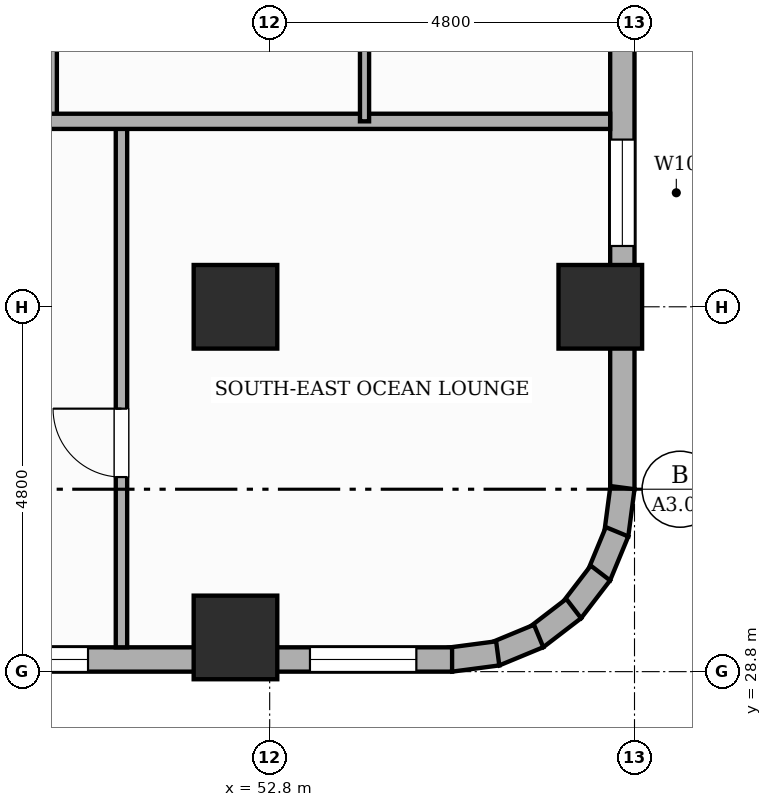
"""IFC4 building model, lengths in metres.
Left out: names, types, materials, properties, quantities, classifications, styles, units other than length and angle.
Written with IfcOpenShell. Run it as: python <this file> out.ifc"""

import sys

from ifc_helpers import new_model, si_unit, direction, frame, frame_2d, origin, origin_2d, place, context, subcontext, project, spatial, rectangle, extrude, element, fill, save


model = new_model("IFC4")
c1 = context("Model", 3, precision=1e-05, world=origin(), true_north=direction((0.0, 1.0)))
c2 = subcontext(c1, "Body", "Model", "MODEL_VIEW")
j1 = project(units=[si_unit("LENGTHUNIT", "METRE"), si_unit("PLANEANGLEUNIT", "RADIAN")], contexts=[c1])
p1 = place(None, origin())
s1 = spatial("IfcSite", under=j1, at=p1, CompositionType="ELEMENT")
p2 = place(p1, origin())
s2 = spatial("IfcBuilding", under=s1, at=p2, CompositionType="ELEMENT")
p3 = place(p2, frame((0.0, 0.0, 25.0)))
s3 = spatial("IfcBuildingStorey", under=s2, at=p3, CompositionType="ELEMENT", Elevation=25.0)
for number, where, z_axis, x_axis in (
    (1, (52.35, 29.25, 0.0), (0.0, 0.0, 1.0), (1.0, 0.0, 0.0)),
    (2, (52.35, 33.6, 0.0), (0.0, 0.0, 1.0), (1.0, 0.0, 0.0)),
    (3, (57.15, 33.6, 0.0), (0.0, 0.0, 1.0), (1.0, 0.0, 0.0)),
):
    element("IfcColumn", number, at=place(p3, frame(where, z_axis=z_axis, x_axis=x_axis)), inside=s3, PredefinedType="COLUMN", context=c2, shape_type="SweptSolid", body=[
        extrude(rectangle(XDim=1.1, YDim=1.1, at=origin_2d()), origin(), (0.0, 0.0, 1.0), 3.6),
    ])
p4 = place(p3, frame((57.44, 45.6, 0.0), z_axis=(0.0, 0.0, 1.0), x_axis=(0.0, -1.0, 0.0)))
e4 = element("IfcWall", 4, at=p4, inside=s3, PredefinedType="STANDARD", context=c2, shape_type="SweptSolid", body=[
    extrude(rectangle(XDim=14.4, YDim=0.32, at=frame_2d((7.2, 0.0))), origin(), (0.0, 0.0, 1.0), 2.53),
])
p5 = place(p4, frame((5.428, 0.0, 0.45)))
e5 = element("IfcOpeningElement", 5, at=p5, cuts=e4, PredefinedType="OPENING", context=c2, shape_type="SweptSolid", body=[
    extrude(rectangle(XDim=0.95, YDim=1.8, at=frame_2d((0.475, 0.9))), frame((0.0, 0.17, 0.0), z_axis=(0.0, -1.0, 0.0), x_axis=(1.0, 0.0, 0.0)), (0.0, 0.0, 1.0), 0.34),
])
p6 = place(p4, frame((9.8, 0.0, 0.65)))
e6 = element("IfcOpeningElement", 6, at=p6, cuts=e4, PredefinedType="OPENING", context=c2, shape_type="SweptSolid", body=[
    extrude(rectangle(XDim=1.4, YDim=1.1, at=frame_2d((0.7, 0.55))), frame((0.0, 0.17, 0.0), z_axis=(0.0, -1.0, 0.0), x_axis=(1.0, 0.0, 0.0)), (0.0, 0.0, 1.0), 0.34),
])
p7 = place(p4, frame((0.771, 0.0, 0.45)))
e7 = element("IfcOpeningElement", 7, at=p7, cuts=e4, PredefinedType="OPENING", context=c2, shape_type="SweptSolid", body=[
    extrude(rectangle(XDim=0.75, YDim=1.8, at=frame_2d((0.375, 0.9))), frame((0.0, 0.17, 0.0), z_axis=(0.0, -1.0, 0.0), x_axis=(1.0, 0.0, 0.0)), (0.0, 0.0, 1.0), 0.34),
])
p8 = place(p3, frame((57.441, 31.221, 0.0), z_axis=(0.0, 0.0, 1.0), x_axis=(-0.130504898859, -0.991447664465, 0.0)))
e8 = element("IfcWall", 8, at=p8, inside=s3, PredefinedType="STANDARD", context=c2, shape_type="SweptSolid", body=[
    extrude(rectangle(XDim=0.627, YDim=0.32, at=frame_2d((0.313, 0.0))), origin(), (0.0, 0.0, 1.0), 3.35),
])
p9 = place(p3, frame((57.37, 30.64, 0.0), z_axis=(0.0, 0.0, 1.0), x_axis=(-0.382787856107, -0.923836271867, 0.0)))
e9 = element("IfcWall", 9, at=p9, inside=s3, PredefinedType="STANDARD", context=c2, shape_type="SweptSolid", body=[
    extrude(rectangle(XDim=0.626, YDim=0.32, at=frame_2d((0.313, 0.0))), origin(), (0.0, 0.0, 1.0), 3.35),
])
p10 = place(p3, frame((57.152, 30.097, 0.0), z_axis=(0.0, 0.0, 1.0), x_axis=(-0.608693302629, -0.793405610854, 0.0)))
e10 = element("IfcWall", 10, at=p10, inside=s3, PredefinedType="STANDARD", context=c2, shape_type="SweptSolid", body=[
    extrude(rectangle(XDim=0.626, YDim=0.32, at=frame_2d((0.313, 0.0))), origin(), (0.0, 0.0, 1.0), 3.35),
])
p11 = place(p3, frame((56.8, 29.63, 0.0), z_axis=(0.0, 0.0, 1.0), x_axis=(-0.793361818833, -0.608750379399, 0.0)))
e11 = element("IfcWall", 11, at=p11, inside=s3, PredefinedType="STANDARD", context=c2, shape_type="SweptSolid", body=[
    extrude(rectangle(XDim=0.627, YDim=0.32, at=frame_2d((0.313, 0.0))), origin(), (0.0, 0.0, 1.0), 3.35),
])
for number, where, z_axis, x_axis in (
    (12, (56.339, 29.269, 0.0), (0.0, 0.0, 1.0), (-0.924, -0.383, 0.0)),
    (13, (55.8, 29.04, 0.0), (0.0, 0.0, 1.0), (-0.991, -0.131, 0.0)),
):
    element("IfcWall", number, at=place(p3, frame(where, z_axis=z_axis, x_axis=x_axis)), inside=s3, PredefinedType="STANDARD", context=c2, shape_type="SweptSolid", body=[
        extrude(rectangle(XDim=0.626, YDim=0.32, at=frame_2d((0.313, 0.0))), origin(), (0.0, 0.0, 1.0), 3.35),
    ])
p12 = place(p3, frame((55.2, 28.96, 0.0), z_axis=(0.0, 0.0, 1.0), x_axis=(-1.0, 0.0, 0.0)))
e14 = element("IfcWall", 14, at=p12, inside=s3, PredefinedType="STANDARD", context=c2, shape_type="SweptSolid", body=[
    extrude(rectangle(XDim=28.8, YDim=0.32, at=frame_2d((14.4, 0.0))), origin(), (0.0, 0.0, 1.0), 2.53),
])
p13 = place(p12, frame((24.115, 0.0, 0.65)))
e15 = element("IfcOpeningElement", 15, at=p13, cuts=e14, PredefinedType="OPENING", context=c2, shape_type="SweptSolid", body=[
    extrude(rectangle(XDim=1.4, YDim=1.1, at=frame_2d((0.7, 0.55))), frame((0.0, 0.17, 0.0), z_axis=(0.0, -1.0, 0.0), x_axis=(1.0, 0.0, 0.0)), (0.0, 0.0, 1.0), 0.34),
])
p14 = place(p12, frame((12.991, 0.0, 0.65)))
e16 = element("IfcOpeningElement", 16, at=p14, cuts=e14, PredefinedType="OPENING", context=c2, shape_type="SweptSolid", body=[
    extrude(rectangle(XDim=1.4, YDim=1.1, at=frame_2d((0.7, 0.55))), frame((0.0, 0.17, 0.0), z_axis=(0.0, -1.0, 0.0), x_axis=(1.0, 0.0, 0.0)), (0.0, 0.0, 1.0), 0.34),
])
p15 = place(p12, frame((19.869, 0.0, 0.45)))
e17 = element("IfcOpeningElement", 17, at=p15, cuts=e14, PredefinedType="OPENING", context=c2, shape_type="SweptSolid", body=[
    extrude(rectangle(XDim=0.95, YDim=1.8, at=frame_2d((0.475, 0.9))), frame((0.0, 0.17, 0.0), z_axis=(0.0, -1.0, 0.0), x_axis=(1.0, 0.0, 0.0)), (0.0, 0.0, 1.0), 0.34),
])
p16 = place(p12, frame((4.79, 0.0, 0.65)))
e18 = element("IfcOpeningElement", 18, at=p16, cuts=e14, PredefinedType="OPENING", context=c2, shape_type="SweptSolid", body=[
    extrude(rectangle(XDim=1.4, YDim=1.1, at=frame_2d((0.7, 0.55))), frame((0.0, 0.17, 0.0), z_axis=(0.0, -1.0, 0.0), x_axis=(1.0, 0.0, 0.0)), (0.0, 0.0, 1.0), 0.34),
])
p17 = place(p12, frame((0.47, 0.0, 0.65)))
e19 = element("IfcOpeningElement", 19, at=p17, cuts=e14, PredefinedType="OPENING", context=c2, shape_type="SweptSolid", body=[
    extrude(rectangle(XDim=1.4, YDim=1.1, at=frame_2d((0.7, 0.55))), frame((0.0, 0.17, 0.0), z_axis=(0.0, -1.0, 0.0), x_axis=(1.0, 0.0, 0.0)), (0.0, 0.0, 1.0), 0.34),
])
p18 = place(p12, frame((15.046, 0.0, 0.45)))
e20 = element("IfcOpeningElement", 20, at=p18, cuts=e14, PredefinedType="OPENING", context=c2, shape_type="SweptSolid", body=[
    extrude(rectangle(XDim=0.95, YDim=1.8, at=frame_2d((0.475, 0.9))), frame((0.0, 0.17, 0.0), z_axis=(0.0, -1.0, 0.0), x_axis=(1.0, 0.0, 0.0)), (0.0, 0.0, 1.0), 0.34),
])
p19 = place(p3, frame((49.9, 36.04, 0.0), z_axis=(0.0, 0.0, 1.0), x_axis=(0.0, 1.0, 0.0)))
e21 = element("IfcWall", 21, at=p19, inside=s3, PredefinedType="PARTITIONING", context=c2, shape_type="SweptSolid", body=[
    extrude(rectangle(XDim=11.64, YDim=0.2, at=frame_2d((5.82, 0.0))), origin(), (0.0, 0.0, 1.0), 3.35),
])
p20 = place(p19, frame((6.251, 0.0, 0.0)))
e22 = element("IfcOpeningElement", 22, at=p20, cuts=e21, PredefinedType="OPENING", context=c2, shape_type="SweptSolid", body=[
    extrude(rectangle(XDim=0.98, YDim=2.18, at=frame_2d((0.49, 1.09))), frame((0.0, 0.11, 0.0), z_axis=(0.0, -1.0, 0.0), x_axis=(1.0, 0.0, 0.0)), (0.0, 0.0, 1.0), 0.22),
])
p21 = place(p3, frame((50.85, 29.12, 0.0), z_axis=(0.0, 0.0, 1.0), x_axis=(0.0, 1.0, 0.0)))
e23 = element("IfcWall", 23, at=p21, inside=s3, PredefinedType="PARTITIONING", context=c2, shape_type="SweptSolid", body=[
    extrude(rectangle(XDim=6.92, YDim=0.15, at=frame_2d((3.46, 0.0))), origin(), (0.0, 0.0, 1.0), 3.35),
])
p22 = place(p21, frame((2.24, 0.0, 0.0)))
e24 = element("IfcOpeningElement", 24, at=p22, cuts=e23, PredefinedType="OPENING", context=c2, shape_type="SweptSolid", body=[
    extrude(rectangle(XDim=0.9, YDim=2.15, at=frame_2d((0.45, 1.075))), frame((0.0, 0.085, 0.0), z_axis=(0.0, -1.0, 0.0), x_axis=(1.0, 0.0, 0.0)), (0.0, 0.0, 1.0), 0.17),
])
p23 = place(p3, frame((49.9, 36.04, 0.0), z_axis=(0.0, 0.0, 1.0), x_axis=(1.0, 0.0, 0.0)))
e25 = element("IfcWall", 25, at=p23, inside=s3, PredefinedType="SOLIDWALL", context=c2, shape_type="SweptSolid", body=[
    extrude(rectangle(XDim=7.38, YDim=0.2, at=frame_2d((3.69, 0.0))), origin(), (0.0, 0.0, 1.0), 3.35),
])
p24 = place(p3, frame((54.048, 36.04, 0.0), z_axis=(0.0, 0.0, 1.0), x_axis=(0.0, 1.0, 0.0)))
e26 = element("IfcWall", 26, at=p24, inside=s3, PredefinedType="PARTITIONING", context=c2, shape_type="SweptSolid", body=[
    extrude(rectangle(XDim=4.384, YDim=0.12, at=frame_2d((2.192, 0.0))), origin(), (0.0, 0.0, 1.0), 3.35),
])
p25 = place(p6, origin())
e27 = element("IfcWindow", 27, at=p25, inside=s3, PartitioningType="SINGLE_PANEL", PredefinedType="WINDOW", context=c2, shape_type="SweptSolid", body=[
    extrude(rectangle(XDim=1.4, YDim=1.1, at=frame_2d((0.7, 0.55))), frame((0.0, 0.03, 0.0), z_axis=(0.0, -1.0, 0.0), x_axis=(1.0, 0.0, 0.0)), (0.0, 0.0, 1.0), 0.06),
])
fill(e6, e27)
p26 = place(p16, origin())
e28 = element("IfcWindow", 28, at=p26, inside=s3, PartitioningType="SINGLE_PANEL", PredefinedType="WINDOW", context=c2, shape_type="SweptSolid", body=[
    extrude(rectangle(XDim=1.4, YDim=1.1, at=frame_2d((0.7, 0.55))), frame((0.0, 0.03, 0.0), z_axis=(0.0, -1.0, 0.0), x_axis=(1.0, 0.0, 0.0)), (0.0, 0.0, 1.0), 0.06),
])
fill(e18, e28)
p27 = place(p17, origin())
e29 = element("IfcWindow", 29, at=p27, inside=s3, PartitioningType="SINGLE_PANEL", PredefinedType="WINDOW", context=c2, shape_type="SweptSolid", body=[
    extrude(rectangle(XDim=1.4, YDim=1.1, at=frame_2d((0.7, 0.55))), frame((0.0, 0.03, 0.0), z_axis=(0.0, -1.0, 0.0), x_axis=(1.0, 0.0, 0.0)), (0.0, 0.0, 1.0), 0.06),
])
fill(e19, e29)
p28 = place(p22, origin())
e30 = element("IfcDoor", 30, at=p28, inside=s3, OperationType="SINGLE_SWING_RIGHT", PredefinedType="DOOR", context=c2, shape_type="SweptSolid", body=[
    extrude(rectangle(XDim=0.9, YDim=2.15, at=frame_2d((0.45, 1.075))), frame((0.0, 0.025, 0.0), z_axis=(0.0, -1.0, 0.0), x_axis=(1.0, 0.0, 0.0)), (0.0, 0.0, 1.0), 0.05),
])
fill(e24, e30)
save(model, sys.argv[1])
